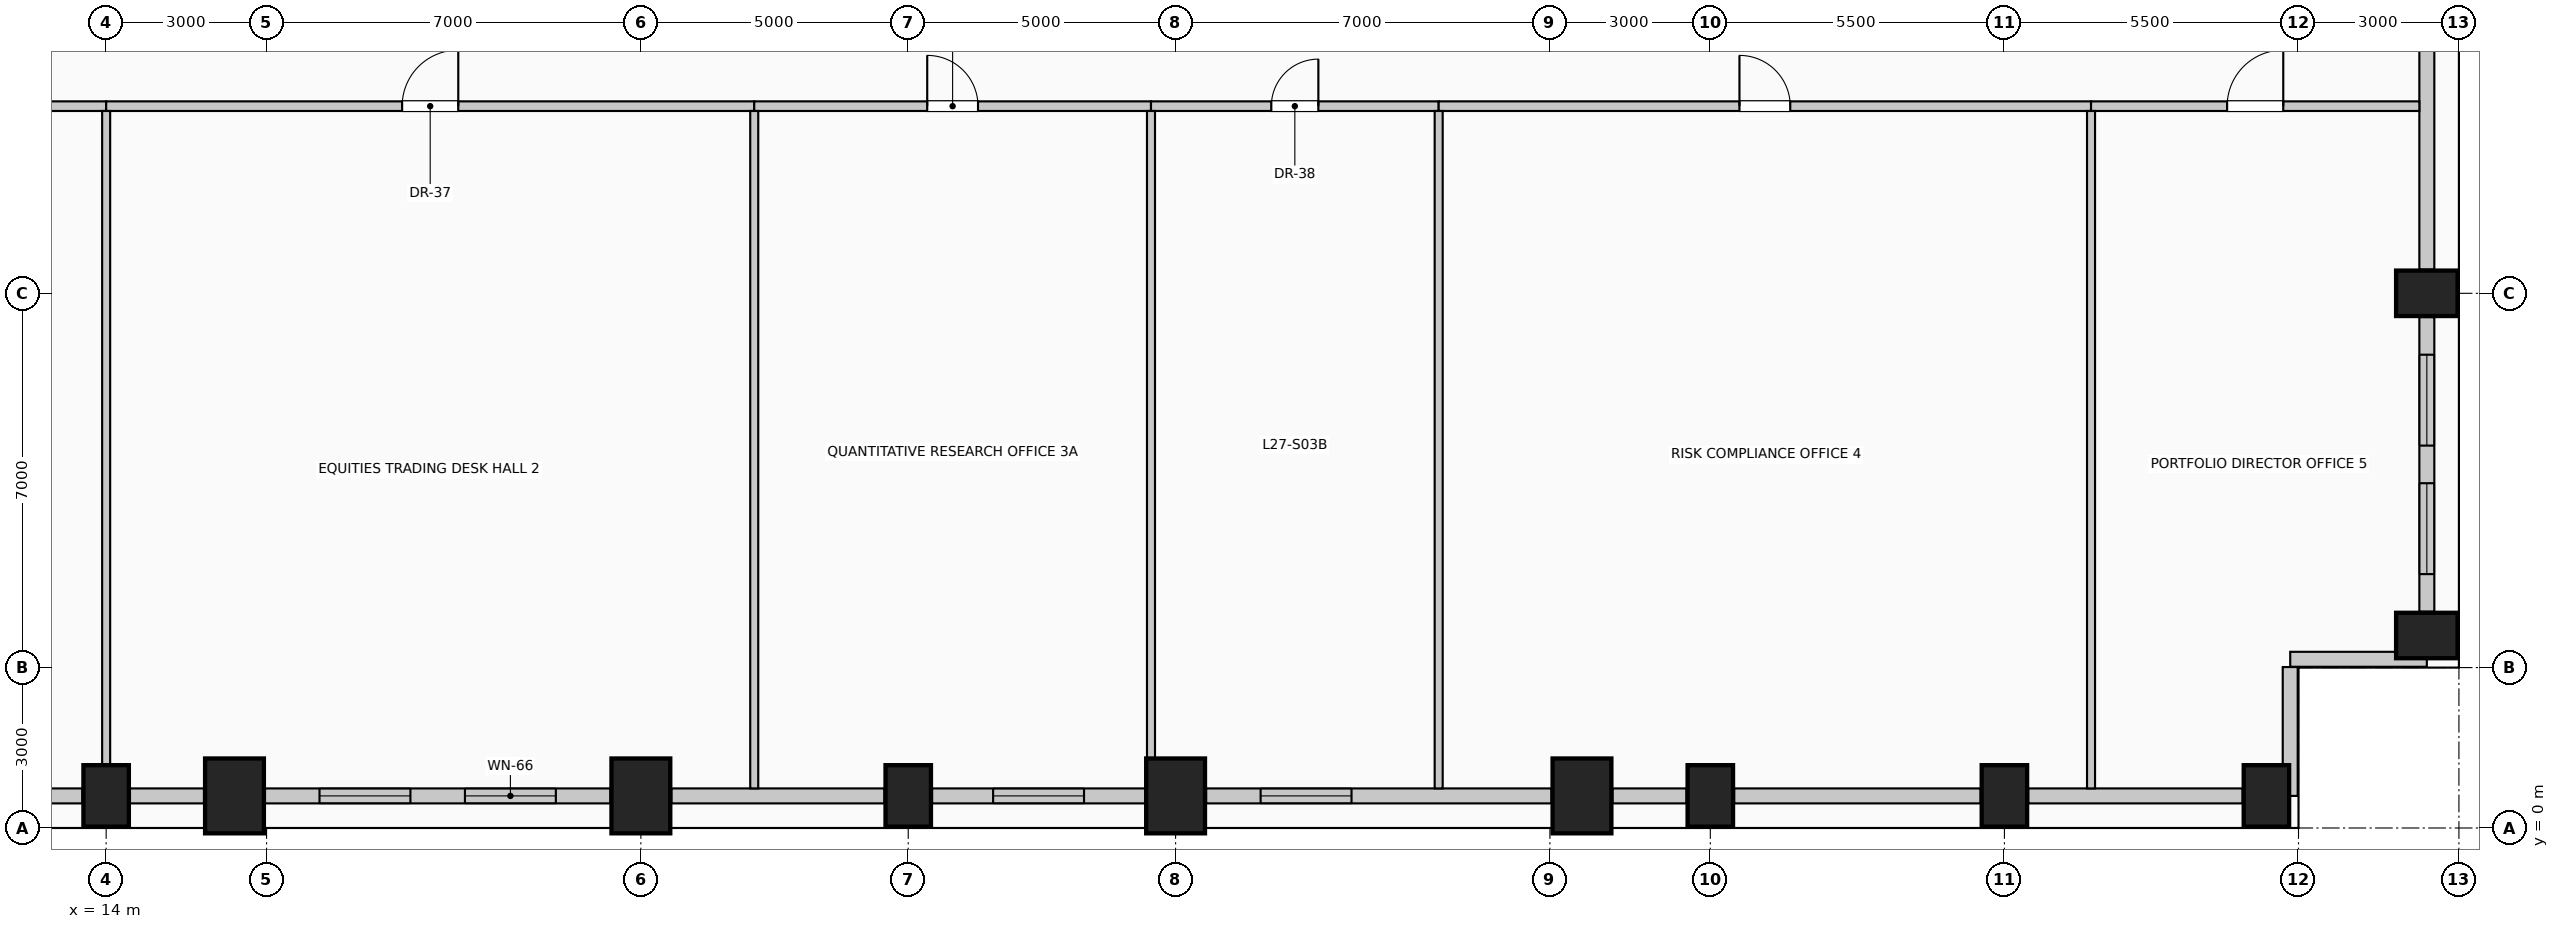
"""IFC4 building model, lengths in metres.
Left out: names, types, materials, properties, quantities, classifications, styles, units other than length and angle.
Written with IfcOpenShell. Run it as: python <this file> out.ifc"""

import sys

from ifc_helpers import new_model, si_unit, direction, frame, frame_2d, origin, origin_2d, place, context, subcontext, project, spatial, rectangle, extrude, element, fill, save


model = new_model("IFC4")
c1 = context("Model", 3, precision=1e-05, world=origin(), true_north=direction((0.0, 1.0)))
c2 = subcontext(c1, "Body", "Model", "MODEL_VIEW")
j1 = project(units=[si_unit("LENGTHUNIT", "METRE"), si_unit("PLANEANGLEUNIT", "RADIAN")], contexts=[c1])
p1 = place(None, origin())
s1 = spatial("IfcSite", under=j1, at=p1, CompositionType="ELEMENT")
p2 = place(p1, origin())
s2 = spatial("IfcBuilding", under=s1, at=p2, CompositionType="ELEMENT")
p3 = place(p2, frame((0.0, 0.0, 112.6)))
s3 = spatial("IfcBuildingStorey", under=s2, at=p3, CompositionType="ELEMENT", Elevation=112.6)
p4 = place(p3, frame((14.0, 0.6, 0.0), z_axis=(0.0, 0.0, 1.0), x_axis=(1.0, 0.0, 0.0)))
e1 = element("IfcColumn", 1, at=p4, inside=s3, PredefinedType="COLUMN", context=c2, shape_type="SweptSolid", body=[
    extrude(rectangle(XDim=0.85, YDim=1.15, at=origin_2d()), origin(), (0.0, 0.0, 1.0), 4.0),
])
for number, where, z_axis, x_axis in (
    (2, (16.4, 0.6, 0.0), (0.0, 0.0, 1.0), (1.0, 0.0, 0.0)),
    (3, (24.0, 0.6, 0.0), (0.0, 0.0, 1.0), (1.0, 0.0, 0.0)),
):
    element("IfcColumn", number, at=place(p3, frame(where, z_axis=z_axis, x_axis=x_axis)), inside=s3, PredefinedType="COLUMN", context=c2, shape_type="SweptSolid", body=[
        extrude(rectangle(XDim=1.1, YDim=1.4, at=origin_2d()), origin(), (0.0, 0.0, 1.0), 4.0),
    ])
p5 = place(p3, frame((29.0, 0.6, 0.0), z_axis=(0.0, 0.0, 1.0), x_axis=(1.0, 0.0, 0.0)))
e4 = element("IfcColumn", 4, at=p5, inside=s3, PredefinedType="COLUMN", context=c2, shape_type="SweptSolid", body=[
    extrude(rectangle(XDim=0.85, YDim=1.15, at=origin_2d()), origin(), (0.0, 0.0, 1.0), 4.0),
])
for number, where, z_axis, x_axis in (
    (5, (34.0, 0.6, 0.0), (0.0, 0.0, 1.0), (1.0, 0.0, 0.0)),
    (6, (41.6, 0.6, 0.0), (0.0, 0.0, 1.0), (1.0, 0.0, 0.0)),
):
    element("IfcColumn", number, at=place(p3, frame(where, z_axis=z_axis, x_axis=x_axis)), inside=s3, PredefinedType="COLUMN", context=c2, shape_type="SweptSolid", body=[
        extrude(rectangle(XDim=1.1, YDim=1.4, at=origin_2d()), origin(), (0.0, 0.0, 1.0), 4.0),
    ])
for number, where, z_axis, x_axis in (
    (7, (44.0, 0.6, 0.0), (0.0, 0.0, 1.0), (1.0, 0.0, 0.0)),
    (8, (49.5, 0.6, 0.0), (0.0, 0.0, 1.0), (1.0, 0.0, 0.0)),
    (9, (54.4, 0.6, 0.0), (0.0, 0.0, 1.0), (1.0, 0.0, 0.0)),
    (10, (57.4, 3.6, 0.0), (0.0, 0.0, 1.0), (0.0, 1.0, 0.0)),
    (11, (57.4, 10.0, 0.0), (0.0, 0.0, 1.0), (0.0, 1.0, 0.0)),
):
    element("IfcColumn", number, at=place(p3, frame(where, z_axis=z_axis, x_axis=x_axis)), inside=s3, PredefinedType="COLUMN", context=c2, shape_type="SweptSolid", body=[
        extrude(rectangle(XDim=0.85, YDim=1.15, at=origin_2d()), origin(), (0.0, 0.0, 1.0), 4.0),
    ])
p6 = place(p3, frame((13.555, 0.6, 0.0), z_axis=(0.0, 0.0, 1.0), x_axis=(-1.0, 0.0, 0.0)))
e12 = element("IfcWall", 12, at=p6, inside=s3, PredefinedType="SOLIDWALL", context=c2, shape_type="SweptSolid", body=[
    extrude(rectangle(XDim=4.61, YDim=0.28, at=frame_2d((2.305, 0.0))), origin(), (0.0, 0.0, 1.0), 2.875),
])
p7 = place(p3, frame((15.83, 0.6, 0.0), z_axis=(0.0, 0.0, 1.0), x_axis=(-1.0, 0.0, 0.0)))
e13 = element("IfcWall", 13, at=p7, inside=s3, PredefinedType="SOLIDWALL", context=c2, shape_type="SweptSolid", body=[
    extrude(rectangle(XDim=1.385, YDim=0.28, at=frame_2d((0.692, 0.0))), origin(), (0.0, 0.0, 1.0), 2.875),
])
p8 = place(p3, frame((23.43, 0.6, 0.0), z_axis=(0.0, 0.0, 1.0), x_axis=(-1.0, 0.0, 0.0)))
e14 = element("IfcWall", 14, at=p8, inside=s3, PredefinedType="SOLIDWALL", context=c2, shape_type="SweptSolid", body=[
    extrude(rectangle(XDim=6.46, YDim=0.28, at=frame_2d((3.23, 0.0))), origin(), (0.0, 0.0, 1.0), 2.875),
])
p9 = place(p8, frame((1.02, 0.0, 0.5)))
e15 = element("IfcOpeningElement", 15, at=p9, cuts=e14, PredefinedType="OPENING", context=c2, shape_type="SweptSolid", body=[
    extrude(rectangle(XDim=1.7, YDim=1.95, at=frame_2d((0.85, 0.975))), frame((0.0, 0.15, 0.0), z_axis=(0.0, -1.0, 0.0), x_axis=(1.0, 0.0, 0.0)), (0.0, 0.0, 1.0), 0.3),
])
p10 = place(p8, frame((3.74, 0.0, 0.5)))
e16 = element("IfcOpeningElement", 16, at=p10, cuts=e14, PredefinedType="OPENING", context=c2, shape_type="SweptSolid", body=[
    extrude(rectangle(XDim=1.7, YDim=1.95, at=frame_2d((0.85, 0.975))), frame((0.0, 0.15, 0.0), z_axis=(0.0, -1.0, 0.0), x_axis=(1.0, 0.0, 0.0)), (0.0, 0.0, 1.0), 0.3),
])
p11 = place(p3, frame((28.555, 0.6, 0.0), z_axis=(0.0, 0.0, 1.0), x_axis=(-1.0, 0.0, 0.0)))
e17 = element("IfcWall", 17, at=p11, inside=s3, PredefinedType="SOLIDWALL", context=c2, shape_type="SweptSolid", body=[
    extrude(rectangle(XDim=3.985, YDim=0.28, at=frame_2d((1.992, 0.0))), origin(), (0.0, 0.0, 1.0), 2.875),
])
p12 = place(p3, frame((33.43, 0.6, 0.0), z_axis=(0.0, 0.0, 1.0), x_axis=(-1.0, 0.0, 0.0)))
e18 = element("IfcWall", 18, at=p12, inside=s3, PredefinedType="SOLIDWALL", context=c2, shape_type="SweptSolid", body=[
    extrude(rectangle(XDim=3.985, YDim=0.28, at=frame_2d((1.992, 0.0))), origin(), (0.0, 0.0, 1.0), 2.875),
])
p13 = place(p12, frame((1.143, 0.0, 0.5)))
e19 = element("IfcOpeningElement", 19, at=p13, cuts=e18, PredefinedType="OPENING", context=c2, shape_type="SweptSolid", body=[
    extrude(rectangle(XDim=1.7, YDim=1.95, at=frame_2d((0.85, 0.975))), frame((0.0, 0.15, 0.0), z_axis=(0.0, -1.0, 0.0), x_axis=(1.0, 0.0, 0.0)), (0.0, 0.0, 1.0), 0.3),
])
p14 = place(p3, frame((41.03, 0.6, 0.0), z_axis=(0.0, 0.0, 1.0), x_axis=(-1.0, 0.0, 0.0)))
e20 = element("IfcWall", 20, at=p14, inside=s3, PredefinedType="SOLIDWALL", context=c2, shape_type="SweptSolid", body=[
    extrude(rectangle(XDim=6.46, YDim=0.28, at=frame_2d((3.23, 0.0))), origin(), (0.0, 0.0, 1.0), 2.875),
])
p15 = place(p14, frame((3.74, 0.0, 0.5)))
e21 = element("IfcOpeningElement", 21, at=p15, cuts=e20, PredefinedType="OPENING", context=c2, shape_type="SweptSolid", body=[
    extrude(rectangle(XDim=1.7, YDim=1.95, at=frame_2d((0.85, 0.975))), frame((0.0, 0.15, 0.0), z_axis=(0.0, -1.0, 0.0), x_axis=(1.0, 0.0, 0.0)), (0.0, 0.0, 1.0), 0.3),
])
p16 = place(p3, frame((43.555, 0.6, 0.0), z_axis=(0.0, 0.0, 1.0), x_axis=(-1.0, 0.0, 0.0)))
e22 = element("IfcWall", 22, at=p16, inside=s3, PredefinedType="SOLIDWALL", context=c2, shape_type="SweptSolid", body=[
    extrude(rectangle(XDim=1.385, YDim=0.28, at=frame_2d((0.692, 0.0))), origin(), (0.0, 0.0, 1.0), 2.875),
])
p17 = place(p3, frame((49.055, 0.6, 0.0), z_axis=(0.0, 0.0, 1.0), x_axis=(-1.0, 0.0, 0.0)))
e23 = element("IfcWall", 23, at=p17, inside=s3, PredefinedType="SOLIDWALL", context=c2, shape_type="SweptSolid", body=[
    extrude(rectangle(XDim=4.61, YDim=0.28, at=frame_2d((2.305, 0.0))), origin(), (0.0, 0.0, 1.0), 2.875),
])
p18 = place(p3, frame((53.955, 0.6, 0.0), z_axis=(0.0, 0.0, 1.0), x_axis=(-1.0, 0.0, 0.0)))
e24 = element("IfcWall", 24, at=p18, inside=s3, PredefinedType="SOLIDWALL", context=c2, shape_type="SweptSolid", body=[
    extrude(rectangle(XDim=4.01, YDim=0.28, at=frame_2d((2.005, 0.0))), origin(), (0.0, 0.0, 1.0), 2.875),
])
p19 = place(p3, frame((57.4, 9.555, 0.0), z_axis=(0.0, 0.0, 1.0), x_axis=(0.0, -1.0, 0.0)))
e25 = element("IfcWall", 25, at=p19, inside=s3, PredefinedType="SOLIDWALL", context=c2, shape_type="SweptSolid", body=[
    extrude(rectangle(XDim=5.51, YDim=0.28, at=frame_2d((2.755, 0.0))), origin(), (0.0, 0.0, 1.0), 2.875),
])
p20 = place(p19, frame((0.703, 0.0, 0.5)))
e26 = element("IfcOpeningElement", 26, at=p20, cuts=e25, PredefinedType="OPENING", context=c2, shape_type="SweptSolid", body=[
    extrude(rectangle(XDim=1.7, YDim=1.95, at=frame_2d((0.85, 0.975))), frame((0.0, 0.15, 0.0), z_axis=(0.0, -1.0, 0.0), x_axis=(1.0, 0.0, 0.0)), (0.0, 0.0, 1.0), 0.3),
])
p21 = place(p19, frame((3.107, 0.0, 0.5)))
e27 = element("IfcOpeningElement", 27, at=p21, cuts=e25, PredefinedType="OPENING", context=c2, shape_type="SweptSolid", body=[
    extrude(rectangle(XDim=1.7, YDim=1.95, at=frame_2d((0.85, 0.975))), frame((0.0, 0.15, 0.0), z_axis=(0.0, -1.0, 0.0), x_axis=(1.0, 0.0, 0.0)), (0.0, 0.0, 1.0), 0.3),
])
p22 = place(p3, frame((57.4, 17.555, 0.0), z_axis=(0.0, 0.0, 1.0), x_axis=(0.0, -1.0, 0.0)))
e28 = element("IfcWall", 28, at=p22, inside=s3, PredefinedType="SOLIDWALL", context=c2, shape_type="SweptSolid", body=[
    extrude(rectangle(XDim=7.11, YDim=0.28, at=frame_2d((3.555, 0.0))), origin(), (0.0, 0.0, 1.0), 2.875),
])
p23 = place(p3, frame((57.4, 3.155, 0.0), z_axis=(0.0, 0.0, 1.0), x_axis=(-1.0, 0.0, 0.0)))
e29 = element("IfcWall", 29, at=p23, inside=s3, PredefinedType="SOLIDWALL", context=c2, shape_type="SweptSolid", body=[
    extrude(rectangle(XDim=2.555, YDim=0.28, at=frame_2d((1.277, 0.0))), origin(), (0.0, 0.0, 1.0), 3.725),
])
p24 = place(p3, frame((54.845, 3.01, 0.0), z_axis=(0.0, 0.0, 1.0), x_axis=(0.0, -1.0, 0.0)))
e30 = element("IfcWall", 30, at=p24, inside=s3, PredefinedType="SOLIDWALL", context=c2, shape_type="SweptSolid", body=[
    extrude(rectangle(XDim=2.41, YDim=0.28, at=frame_2d((1.205, 0.0))), origin(), (0.0, 0.0, 1.0), 3.725),
])
p25 = place(p3, frame((0.74, 13.5, 0.0), z_axis=(0.0, 0.0, 1.0), x_axis=(1.0, 0.0, 0.0)))
e31 = element("IfcWall", 31, at=p25, inside=s3, PredefinedType="PARTITIONING", context=c2, shape_type="SweptSolid", body=[
    extrude(rectangle(XDim=13.26, YDim=0.18, at=frame_2d((6.63, 0.0))), origin(), (0.0, 0.0, 1.0), 3.725),
])
p26 = place(p25, frame((6.155, 0.0, 0.0)))
e32 = element("IfcOpeningElement", 32, at=p26, cuts=e31, PredefinedType="OPENING", context=c2, shape_type="SweptSolid", body=[
    extrude(rectangle(XDim=0.95, YDim=2.15, at=frame_2d((0.475, 1.075))), frame((0.0, 0.1, 0.0), z_axis=(0.0, -1.0, 0.0), x_axis=(1.0, 0.0, 0.0)), (0.0, 0.0, 1.0), 0.2),
])
p27 = place(p3, frame((14.0, 13.5, 0.0), z_axis=(0.0, 0.0, 1.0), x_axis=(1.0, 0.0, 0.0)))
e33 = element("IfcWall", 33, at=p27, inside=s3, PredefinedType="PARTITIONING", context=c2, shape_type="SweptSolid", body=[
    extrude(rectangle(XDim=12.12, YDim=0.18, at=frame_2d((6.06, 0.0))), origin(), (0.0, 0.0, 1.0), 3.725),
])
p28 = place(p27, frame((5.535, 0.0, 0.0)))
e34 = element("IfcOpeningElement", 34, at=p28, cuts=e33, PredefinedType="OPENING", context=c2, shape_type="SweptSolid", body=[
    extrude(rectangle(XDim=1.05, YDim=2.15, at=frame_2d((0.525, 1.075))), frame((0.0, 0.1, 0.0), z_axis=(0.0, -1.0, 0.0), x_axis=(1.0, 0.0, 0.0)), (0.0, 0.0, 1.0), 0.2),
])
p29 = place(p3, frame((26.12, 13.5, 0.0), z_axis=(0.0, 0.0, 1.0), x_axis=(1.0, 0.0, 0.0)))
e35 = element("IfcWall", 35, at=p29, inside=s3, PredefinedType="PARTITIONING", context=c2, shape_type="SweptSolid", body=[
    extrude(rectangle(XDim=7.42, YDim=0.18, at=frame_2d((3.71, 0.0))), origin(), (0.0, 0.0, 1.0), 3.725),
])
p30 = place(p29, frame((3.235, 0.0, 0.0)))
e36 = element("IfcOpeningElement", 36, at=p30, cuts=e35, PredefinedType="OPENING", context=c2, shape_type="SweptSolid", body=[
    extrude(rectangle(XDim=0.95, YDim=2.15, at=frame_2d((0.475, 1.075))), frame((0.0, 0.1, 0.0), z_axis=(0.0, -1.0, 0.0), x_axis=(1.0, 0.0, 0.0)), (0.0, 0.0, 1.0), 0.2),
])
p31 = place(p3, frame((33.54, 13.5, 0.0), z_axis=(0.0, 0.0, 1.0), x_axis=(1.0, 0.0, 0.0)))
e37 = element("IfcWall", 37, at=p31, inside=s3, PredefinedType="PARTITIONING", context=c2, shape_type="SweptSolid", body=[
    extrude(rectangle(XDim=5.38, YDim=0.18, at=frame_2d((2.69, 0.0))), origin(), (0.0, 0.0, 1.0), 3.725),
])
p32 = place(p31, frame((2.25, 0.0, 0.0)))
e38 = element("IfcOpeningElement", 38, at=p32, cuts=e37, PredefinedType="OPENING", context=c2, shape_type="SweptSolid", body=[
    extrude(rectangle(XDim=0.88, YDim=2.1, at=frame_2d((0.44, 1.05))), frame((0.0, 0.1, 0.0), z_axis=(0.0, -1.0, 0.0), x_axis=(1.0, 0.0, 0.0)), (0.0, 0.0, 1.0), 0.2),
])
p33 = place(p3, frame((38.92, 13.5, 0.0), z_axis=(0.0, 0.0, 1.0), x_axis=(1.0, 0.0, 0.0)))
e39 = element("IfcWall", 39, at=p33, inside=s3, PredefinedType="PARTITIONING", context=c2, shape_type="SweptSolid", body=[
    extrude(rectangle(XDim=12.2, YDim=0.18, at=frame_2d((6.1, 0.0))), origin(), (0.0, 0.0, 1.0), 3.725),
])
p34 = place(p33, frame((5.625, 0.0, 0.0)))
e40 = element("IfcOpeningElement", 40, at=p34, cuts=e39, PredefinedType="OPENING", context=c2, shape_type="SweptSolid", body=[
    extrude(rectangle(XDim=0.95, YDim=2.15, at=frame_2d((0.475, 1.075))), frame((0.0, 0.1, 0.0), z_axis=(0.0, -1.0, 0.0), x_axis=(1.0, 0.0, 0.0)), (0.0, 0.0, 1.0), 0.2),
])
p35 = place(p3, frame((51.12, 13.5, 0.0), z_axis=(0.0, 0.0, 1.0), x_axis=(1.0, 0.0, 0.0)))
e41 = element("IfcWall", 41, at=p35, inside=s3, PredefinedType="PARTITIONING", context=c2, shape_type="SweptSolid", body=[
    extrude(rectangle(XDim=6.14, YDim=0.18, at=frame_2d((3.07, 0.0))), origin(), (0.0, 0.0, 1.0), 3.725),
])
p36 = place(p35, frame((2.545, 0.0, 0.0)))
e42 = element("IfcOpeningElement", 42, at=p36, cuts=e41, PredefinedType="OPENING", context=c2, shape_type="SweptSolid", body=[
    extrude(rectangle(XDim=1.05, YDim=2.15, at=frame_2d((0.525, 1.075))), frame((0.0, 0.1, 0.0), z_axis=(0.0, -1.0, 0.0), x_axis=(1.0, 0.0, 0.0)), (0.0, 0.0, 1.0), 0.2),
])
p37 = place(p3, frame((14.0, 1.175, 0.0), z_axis=(0.0, 0.0, 1.0), x_axis=(0.0, 1.0, 0.0)))
e43 = element("IfcWall", 43, at=p37, inside=s3, PredefinedType="PARTITIONING", context=c2, shape_type="SweptSolid", body=[
    extrude(rectangle(XDim=12.235, YDim=0.15, at=frame_2d((6.117, 0.0))), origin(), (0.0, 0.0, 1.0), 3.725),
])
p38 = place(p3, frame((26.12, 0.74, 0.0), z_axis=(0.0, 0.0, 1.0), x_axis=(0.0, 1.0, 0.0)))
e44 = element("IfcWall", 44, at=p38, inside=s3, PredefinedType="PARTITIONING", context=c2, shape_type="SweptSolid", body=[
    extrude(rectangle(XDim=12.67, YDim=0.15, at=frame_2d((6.335, 0.0))), origin(), (0.0, 0.0, 1.0), 3.725),
])
p39 = place(p3, frame((33.54, 1.3, 0.0), z_axis=(0.0, 0.0, 1.0), x_axis=(0.0, 1.0, 0.0)))
e45 = element("IfcWall", 45, at=p39, inside=s3, PredefinedType="PARTITIONING", context=c2, shape_type="SweptSolid", body=[
    extrude(rectangle(XDim=12.11, YDim=0.15, at=frame_2d((6.055, 0.0))), origin(), (0.0, 0.0, 1.0), 3.725),
])
for number, where, z_axis, x_axis in (
    (46, (38.92, 0.74, 0.0), (0.0, 0.0, 1.0), (0.0, 1.0, 0.0)),
    (47, (51.12, 0.74, 0.0), (0.0, 0.0, 1.0), (0.0, 1.0, 0.0)),
):
    element("IfcWall", number, at=place(p3, frame(where, z_axis=z_axis, x_axis=x_axis)), inside=s3, PredefinedType="PARTITIONING", context=c2, shape_type="SweptSolid", body=[
        extrude(rectangle(XDim=12.67, YDim=0.15, at=frame_2d((6.335, 0.0))), origin(), (0.0, 0.0, 1.0), 3.725),
    ])
p40 = place(p9, origin())
e48 = element("IfcWindow", 48, at=p40, inside=s3, PartitioningType="SINGLE_PANEL", PredefinedType="WINDOW", context=c2, shape_type="SweptSolid", body=[
    extrude(rectangle(XDim=1.7, YDim=1.95, at=frame_2d((0.85, 0.975))), frame((0.0, 0.03, 0.0), z_axis=(0.0, -1.0, 0.0), x_axis=(1.0, 0.0, 0.0)), (0.0, 0.0, 1.0), 0.06),
])
fill(e15, e48)
p41 = place(p10, origin())
e49 = element("IfcWindow", 49, at=p41, inside=s3, PartitioningType="SINGLE_PANEL", PredefinedType="WINDOW", context=c2, shape_type="SweptSolid", body=[
    extrude(rectangle(XDim=1.7, YDim=1.95, at=frame_2d((0.85, 0.975))), frame((0.0, 0.03, 0.0), z_axis=(0.0, -1.0, 0.0), x_axis=(1.0, 0.0, 0.0)), (0.0, 0.0, 1.0), 0.06),
])
fill(e16, e49)
p42 = place(p13, origin())
e50 = element("IfcWindow", 50, at=p42, inside=s3, PartitioningType="SINGLE_PANEL", PredefinedType="WINDOW", context=c2, shape_type="SweptSolid", body=[
    extrude(rectangle(XDim=1.7, YDim=1.95, at=frame_2d((0.85, 0.975))), frame((0.0, 0.03, 0.0), z_axis=(0.0, -1.0, 0.0), x_axis=(1.0, 0.0, 0.0)), (0.0, 0.0, 1.0), 0.06),
])
fill(e19, e50)
p43 = place(p15, origin())
e51 = element("IfcWindow", 51, at=p43, inside=s3, PartitioningType="SINGLE_PANEL", PredefinedType="WINDOW", context=c2, shape_type="SweptSolid", body=[
    extrude(rectangle(XDim=1.7, YDim=1.95, at=frame_2d((0.85, 0.975))), frame((0.0, 0.03, 0.0), z_axis=(0.0, -1.0, 0.0), x_axis=(1.0, 0.0, 0.0)), (0.0, 0.0, 1.0), 0.06),
])
fill(e21, e51)
p44 = place(p20, origin())
e52 = element("IfcWindow", 52, at=p44, inside=s3, PartitioningType="SINGLE_PANEL", PredefinedType="WINDOW", context=c2, shape_type="SweptSolid", body=[
    extrude(rectangle(XDim=1.7, YDim=1.95, at=frame_2d((0.85, 0.975))), frame((0.0, 0.03, 0.0), z_axis=(0.0, -1.0, 0.0), x_axis=(1.0, 0.0, 0.0)), (0.0, 0.0, 1.0), 0.06),
])
fill(e26, e52)
p45 = place(p21, origin())
e53 = element("IfcWindow", 53, at=p45, inside=s3, PartitioningType="SINGLE_PANEL", PredefinedType="WINDOW", context=c2, shape_type="SweptSolid", body=[
    extrude(rectangle(XDim=1.7, YDim=1.95, at=frame_2d((0.85, 0.975))), frame((0.0, 0.03, 0.0), z_axis=(0.0, -1.0, 0.0), x_axis=(1.0, 0.0, 0.0)), (0.0, 0.0, 1.0), 0.06),
])
fill(e27, e53)
p46 = place(p28, origin())
e54 = element("IfcDoor", 54, at=p46, inside=s3, OperationType="SINGLE_SWING_RIGHT", PredefinedType="DOOR", context=c2, shape_type="SweptSolid", body=[
    extrude(rectangle(XDim=1.05, YDim=2.15, at=frame_2d((0.525, 1.075))), frame((0.0, 0.025, 0.0), z_axis=(0.0, -1.0, 0.0), x_axis=(1.0, 0.0, 0.0)), (0.0, 0.0, 1.0), 0.05),
])
fill(e34, e54)
p47 = place(p30, origin())
e55 = element("IfcDoor", 55, at=p47, inside=s3, OperationType="SINGLE_SWING_LEFT", PredefinedType="DOOR", context=c2, shape_type="SweptSolid", body=[
    extrude(rectangle(XDim=0.95, YDim=2.15, at=frame_2d((0.475, 1.075))), frame((0.0, 0.025, 0.0), z_axis=(0.0, -1.0, 0.0), x_axis=(1.0, 0.0, 0.0)), (0.0, 0.0, 1.0), 0.05),
])
fill(e36, e55)
p48 = place(p32, origin())
e56 = element("IfcDoor", 56, at=p48, inside=s3, OperationType="SINGLE_SWING_RIGHT", PredefinedType="DOOR", context=c2, shape_type="SweptSolid", body=[
    extrude(rectangle(XDim=0.88, YDim=2.1, at=frame_2d((0.44, 1.05))), frame((0.0, 0.025, 0.0), z_axis=(0.0, -1.0, 0.0), x_axis=(1.0, 0.0, 0.0)), (0.0, 0.0, 1.0), 0.05),
])
fill(e38, e56)
p49 = place(p34, origin())
e57 = element("IfcDoor", 57, at=p49, inside=s3, OperationType="SINGLE_SWING_LEFT", PredefinedType="DOOR", context=c2, shape_type="SweptSolid", body=[
    extrude(rectangle(XDim=0.95, YDim=2.15, at=frame_2d((0.475, 1.075))), frame((0.0, 0.025, 0.0), z_axis=(0.0, -1.0, 0.0), x_axis=(1.0, 0.0, 0.0)), (0.0, 0.0, 1.0), 0.05),
])
fill(e40, e57)
p50 = place(p36, origin())
e58 = element("IfcDoor", 58, at=p50, inside=s3, OperationType="SINGLE_SWING_RIGHT", PredefinedType="DOOR", context=c2, shape_type="SweptSolid", body=[
    extrude(rectangle(XDim=1.05, YDim=2.15, at=frame_2d((0.525, 1.075))), frame((0.0, 0.025, 0.0), z_axis=(0.0, -1.0, 0.0), x_axis=(1.0, 0.0, 0.0)), (0.0, 0.0, 1.0), 0.05),
])
fill(e42, e58)
save(model, sys.argv[1])
